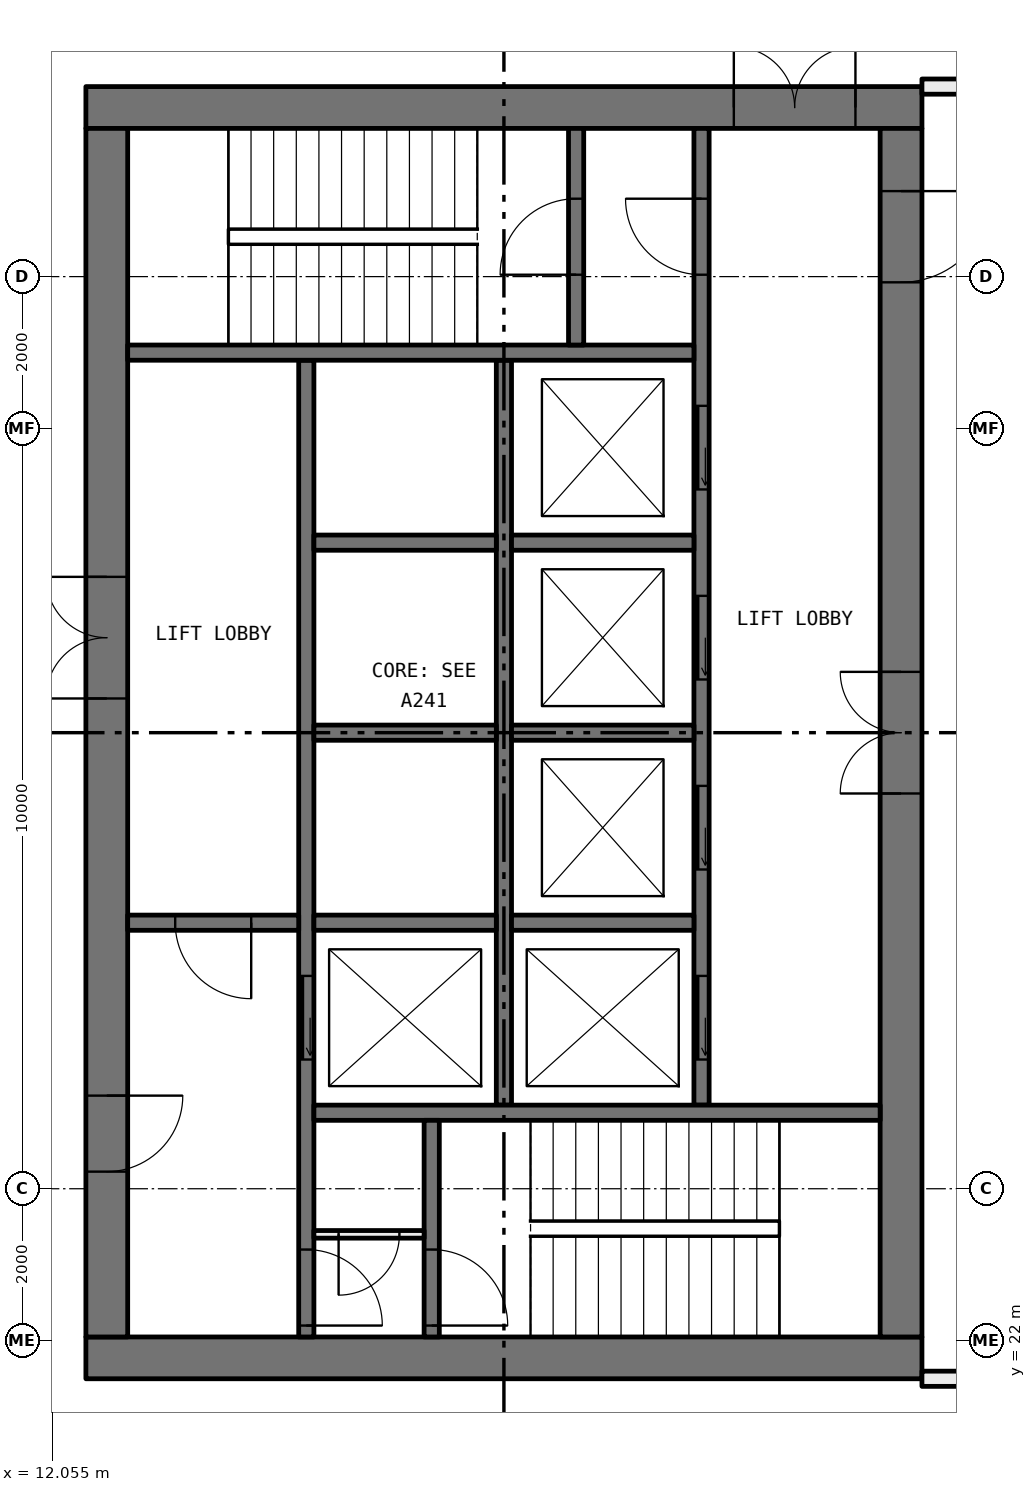
"""IFC4 building model, lengths in metres.
Left out: names, types, materials, properties, quantities, classifications, styles, units other than length and angle.
Written with IfcOpenShell. Run it as: python <this file> out.ifc"""

import sys

from ifc_helpers import new_model, si_unit, direction, frame, frame_2d, origin, place, context, subcontext, project, spatial, rectangle, extrude, element, fill, save


model = new_model("IFC4")
c1 = context("Model", 3, precision=1e-05, world=origin(), true_north=direction((0.0, 1.0)))
c2 = subcontext(c1, "Body", "Model", "MODEL_VIEW")
j1 = project(units=[si_unit("LENGTHUNIT", "METRE"), si_unit("PLANEANGLEUNIT", "RADIAN")], contexts=[c1])
p1 = place(None, origin())
s1 = spatial("IfcSite", under=j1, at=p1, CompositionType="ELEMENT")
p2 = place(p1, origin())
s2 = spatial("IfcBuilding", under=s1, at=p2, CompositionType="ELEMENT")
p3 = place(p2, frame((0.0, 0.0, 153.75)))
s3 = spatial("IfcBuildingStorey", under=s2, at=p3, CompositionType="ELEMENT", Elevation=153.75)
p4 = place(p3, frame((23.5, 21.5, 0.0), z_axis=(0.0, 0.0, 1.0), x_axis=(1.0, 0.0, 0.0)))
e1 = element("IfcWall", 1, at=p4, inside=s3, PredefinedType="PARTITIONING", context=c2, shape_type="SweptSolid", body=[
    extrude(rectangle(XDim=6.0, YDim=0.2, at=frame_2d((3.0, 0.0))), origin(), (0.0, 0.0, 1.0), 4.1),
])
p5 = place(p4, frame((2.55, 0.0, 0.0)))
e2 = element("IfcOpeningElement", 2, at=p5, cuts=e1, PredefinedType="OPENING", context=c2, shape_type="SweptSolid", body=[
    extrude(rectangle(XDim=0.9, YDim=2.1, at=frame_2d((0.45, 1.05))), frame((0.0, 0.11, 0.0), z_axis=(0.0, -1.0, 0.0), x_axis=(1.0, 0.0, 0.0)), (0.0, 0.0, 1.0), 0.22),
])
p6 = place(p3, frame((29.5, 38.5, 0.0), z_axis=(0.0, 0.0, 1.0), x_axis=(-1.0, 0.0, 0.0)))
e3 = element("IfcWall", 3, at=p6, inside=s3, PredefinedType="PARTITIONING", context=c2, shape_type="SweptSolid", body=[
    extrude(rectangle(XDim=6.0, YDim=0.2, at=frame_2d((3.0, 0.0))), origin(), (0.0, 0.0, 1.0), 4.1),
])
p7 = place(p3, frame((12.5, 21.775, 0.0), z_axis=(0.0, 0.0, 1.0), x_axis=(1.0, 0.0, 0.0)))
e4 = element("IfcWall", 4, at=p7, inside=s3, PredefinedType="SHEAR", context=c2, shape_type="SweptSolid", body=[
    extrude(rectangle(XDim=11.0, YDim=0.55, at=frame_2d((5.5, 0.0))), origin(), (0.0, 0.0, 1.0), 4.1),
])
p8 = place(p3, frame((12.5, 38.225, 0.0), z_axis=(0.0, 0.0, 1.0), x_axis=(1.0, 0.0, 0.0)))
e5 = element("IfcWall", 5, at=p8, inside=s3, PredefinedType="SHEAR", context=c2, shape_type="SweptSolid", body=[
    extrude(rectangle(XDim=11.0, YDim=0.55, at=frame_2d((5.5, 0.0))), origin(), (0.0, 0.0, 1.0), 4.1),
])
p9 = place(p8, frame((8.525, 0.0, 0.0)))
e6 = element("IfcOpeningElement", 6, at=p9, cuts=e5, PredefinedType="OPENING", context=c2, shape_type="SweptSolid", body=[
    extrude(rectangle(XDim=1.6, YDim=2.1, at=frame_2d((0.8, 1.05))), frame((0.0, 0.285, 0.0), z_axis=(0.0, -1.0, 0.0), x_axis=(1.0, 0.0, 0.0)), (0.0, 0.0, 1.0), 0.57),
])
p10 = place(p3, frame((12.775, 22.05, 0.0), z_axis=(0.0, 0.0, 1.0), x_axis=(0.0, 1.0, 0.0)))
e7 = element("IfcWall", 7, at=p10, inside=s3, PredefinedType="SHEAR", context=c2, shape_type="SweptSolid", body=[
    extrude(rectangle(XDim=15.9, YDim=0.55, at=frame_2d((7.95, 0.0))), origin(), (0.0, 0.0, 1.0), 4.1),
])
p11 = place(p10, frame((8.4, 0.0, 0.0)))
e8 = element("IfcOpeningElement", 8, at=p11, cuts=e7, PredefinedType="OPENING", context=c2, shape_type="SweptSolid", body=[
    extrude(rectangle(XDim=1.6, YDim=2.1, at=frame_2d((0.8, 1.05))), frame((0.0, 0.285, 0.0), z_axis=(0.0, -1.0, 0.0), x_axis=(1.0, 0.0, 0.0)), (0.0, 0.0, 1.0), 0.57),
])
p12 = place(p10, frame((2.175, 0.0, 0.0)))
e9 = element("IfcOpeningElement", 9, at=p12, cuts=e7, PredefinedType="OPENING", context=c2, shape_type="SweptSolid", body=[
    extrude(rectangle(XDim=1.0, YDim=2.1, at=frame_2d((0.5, 1.05))), frame((0.0, 0.285, 0.0), z_axis=(0.0, -1.0, 0.0), x_axis=(1.0, 0.0, 0.0)), (0.0, 0.0, 1.0), 0.57),
])
p13 = place(p3, frame((23.225, 22.05, 0.0), z_axis=(0.0, 0.0, 1.0), x_axis=(0.0, 1.0, 0.0)))
e10 = element("IfcWall", 10, at=p13, inside=s3, PredefinedType="SHEAR", context=c2, shape_type="SweptSolid", body=[
    extrude(rectangle(XDim=15.9, YDim=0.55, at=frame_2d((7.95, 0.0))), origin(), (0.0, 0.0, 1.0), 4.1),
])
p14 = place(p13, frame((7.15, 0.0, 0.0)))
e11 = element("IfcOpeningElement", 11, at=p14, cuts=e10, PredefinedType="OPENING", context=c2, shape_type="SweptSolid", body=[
    extrude(rectangle(XDim=1.6, YDim=2.1, at=frame_2d((0.8, 1.05))), frame((0.0, 0.285, 0.0), z_axis=(0.0, -1.0, 0.0), x_axis=(1.0, 0.0, 0.0)), (0.0, 0.0, 1.0), 0.57),
])
p15 = place(p13, frame((13.875, 0.0, 0.0)))
e12 = element("IfcOpeningElement", 12, at=p15, cuts=e10, PredefinedType="OPENING", context=c2, shape_type="SweptSolid", body=[
    extrude(rectangle(XDim=1.2, YDim=2.1, at=frame_2d((0.6, 1.05))), frame((0.0, 0.285, 0.0), z_axis=(0.0, -1.0, 0.0), x_axis=(1.0, 0.0, 0.0)), (0.0, 0.0, 1.0), 0.57),
])
p16 = place(p3, frame((15.4, 22.05, 0.0), z_axis=(0.0, 0.0, 1.0), x_axis=(0.0, 1.0, 0.0)))
e13 = element("IfcWall", 13, at=p16, inside=s3, PredefinedType="SOLIDWALL", context=c2, shape_type="SweptSolid", body=[
    extrude(rectangle(XDim=12.85, YDim=0.2, at=frame_2d((6.425, 0.0))), origin(), (0.0, 0.0, 1.0), 4.1),
])
p17 = place(p16, frame((3.65, 0.0, 0.0)))
e14 = element("IfcOpeningElement", 14, at=p17, cuts=e13, PredefinedType="OPENING", context=c2, shape_type="SweptSolid", body=[
    extrude(rectangle(XDim=1.1, YDim=2.1, at=frame_2d((0.55, 1.05))), frame((0.0, 0.11, 0.0), z_axis=(0.0, -1.0, 0.0), x_axis=(1.0, 0.0, 0.0)), (0.0, 0.0, 1.0), 0.22),
])
p18 = place(p16, frame((0.15, 0.0, 0.0)))
e15 = element("IfcOpeningElement", 15, at=p18, cuts=e13, PredefinedType="OPENING", context=c2, shape_type="SweptSolid", body=[
    extrude(rectangle(XDim=1.0, YDim=2.1, at=frame_2d((0.5, 1.05))), frame((0.0, 0.11, 0.0), z_axis=(0.0, -1.0, 0.0), x_axis=(1.0, 0.0, 0.0)), (0.0, 0.0, 1.0), 0.22),
])
p19 = place(p3, frame((20.6, 25.1, 0.0), z_axis=(0.0, 0.0, 1.0), x_axis=(0.0, 1.0, 0.0)))
e16 = element("IfcWall", 16, at=p19, inside=s3, PredefinedType="SOLIDWALL", context=c2, shape_type="SweptSolid", body=[
    extrude(rectangle(XDim=12.85, YDim=0.2, at=frame_2d((6.425, 0.0))), origin(), (0.0, 0.0, 1.0), 4.1),
])
p20 = place(p19, frame((0.6, 0.0, 0.0)))
e17 = element("IfcOpeningElement", 17, at=p20, cuts=e16, PredefinedType="OPENING", context=c2, shape_type="SweptSolid", body=[
    extrude(rectangle(XDim=1.1, YDim=2.1, at=frame_2d((0.55, 1.05))), frame((0.0, 0.11, 0.0), z_axis=(0.0, -1.0, 0.0), x_axis=(1.0, 0.0, 0.0)), (0.0, 0.0, 1.0), 0.22),
])
p21 = place(p19, frame((3.1, 0.0, 0.0)))
e18 = element("IfcOpeningElement", 18, at=p21, cuts=e16, PredefinedType="OPENING", context=c2, shape_type="SweptSolid", body=[
    extrude(rectangle(XDim=1.1, YDim=2.1, at=frame_2d((0.55, 1.05))), frame((0.0, 0.11, 0.0), z_axis=(0.0, -1.0, 0.0), x_axis=(1.0, 0.0, 0.0)), (0.0, 0.0, 1.0), 0.22),
])
p22 = place(p19, frame((5.6, 0.0, 0.0)))
e19 = element("IfcOpeningElement", 19, at=p22, cuts=e16, PredefinedType="OPENING", context=c2, shape_type="SweptSolid", body=[
    extrude(rectangle(XDim=1.1, YDim=2.1, at=frame_2d((0.55, 1.05))), frame((0.0, 0.11, 0.0), z_axis=(0.0, -1.0, 0.0), x_axis=(1.0, 0.0, 0.0)), (0.0, 0.0, 1.0), 0.22),
])
p23 = place(p19, frame((8.1, 0.0, 0.0)))
e20 = element("IfcOpeningElement", 20, at=p23, cuts=e16, PredefinedType="OPENING", context=c2, shape_type="SweptSolid", body=[
    extrude(rectangle(XDim=1.1, YDim=2.1, at=frame_2d((0.55, 1.05))), frame((0.0, 0.11, 0.0), z_axis=(0.0, -1.0, 0.0), x_axis=(1.0, 0.0, 0.0)), (0.0, 0.0, 1.0), 0.22),
])
p24 = place(p19, frame((10.925, 0.0, 0.0)))
e21 = element("IfcOpeningElement", 21, at=p24, cuts=e16, PredefinedType="OPENING", context=c2, shape_type="SweptSolid", body=[
    extrude(rectangle(XDim=1.0, YDim=2.1, at=frame_2d((0.5, 1.05))), frame((0.0, 0.11, 0.0), z_axis=(0.0, -1.0, 0.0), x_axis=(1.0, 0.0, 0.0)), (0.0, 0.0, 1.0), 0.22),
])
p25 = place(p3, frame((18.0, 25.1, 0.0), z_axis=(0.0, 0.0, 1.0), x_axis=(0.0, 1.0, 0.0)))
e22 = element("IfcWall", 22, at=p25, inside=s3, PredefinedType="SOLIDWALL", context=c2, shape_type="SweptSolid", body=[
    extrude(rectangle(XDim=9.8, YDim=0.2, at=frame_2d((4.9, 0.0))), origin(), (0.0, 0.0, 1.0), 4.1),
])
for number, where, z_axis, x_axis in (
    (23, (15.5, 25.0, 0.0), (0.0, 0.0, 1.0), (1.0, 0.0, 0.0)),
    (24, (13.05, 35.0, 0.0), (0.0, 0.0, 1.0), (1.0, 0.0, 0.0)),
):
    element("IfcWall", number, at=place(p3, frame(where, z_axis=z_axis, x_axis=x_axis)), inside=s3, PredefinedType="SOLIDWALL", context=c2, shape_type="SweptSolid", body=[
        extrude(rectangle(XDim=7.45, YDim=0.2, at=frame_2d((3.725, 0.0))), origin(), (0.0, 0.0, 1.0), 4.1),
    ])
p26 = place(p3, frame((13.05, 27.5, 0.0), z_axis=(0.0, 0.0, 1.0), x_axis=(1.0, 0.0, 0.0)))
e25 = element("IfcWall", 25, at=p26, inside=s3, PredefinedType="SOLIDWALL", context=c2, shape_type="SweptSolid", body=[
    extrude(rectangle(XDim=2.25, YDim=0.2, at=frame_2d((1.125, 0.0))), origin(), (0.0, 0.0, 1.0), 4.1),
])
p27 = place(p26, frame((0.625, 0.0, 0.0)))
e26 = element("IfcOpeningElement", 26, at=p27, cuts=e25, PredefinedType="OPENING", context=c2, shape_type="SweptSolid", body=[
    extrude(rectangle(XDim=1.0, YDim=2.1, at=frame_2d((0.5, 1.05))), frame((0.0, 0.11, 0.0), z_axis=(0.0, -1.0, 0.0), x_axis=(1.0, 0.0, 0.0)), (0.0, 0.0, 1.0), 0.22),
])
p28 = place(p3, frame((17.05, 22.05, 0.0), z_axis=(0.0, 0.0, 1.0), x_axis=(0.0, 1.0, 0.0)))
e27 = element("IfcWall", 27, at=p28, inside=s3, PredefinedType="SOLIDWALL", context=c2, shape_type="SweptSolid", body=[
    extrude(rectangle(XDim=2.85, YDim=0.2, at=frame_2d((1.425, 0.0))), origin(), (0.0, 0.0, 1.0), 4.1),
])
p29 = place(p28, frame((0.15, 0.0, 0.0)))
e28 = element("IfcOpeningElement", 28, at=p29, cuts=e27, PredefinedType="OPENING", context=c2, shape_type="SweptSolid", body=[
    extrude(rectangle(XDim=1.0, YDim=2.1, at=frame_2d((0.5, 1.05))), frame((0.0, 0.11, 0.0), z_axis=(0.0, -1.0, 0.0), x_axis=(1.0, 0.0, 0.0)), (0.0, 0.0, 1.0), 0.22),
])
p30 = place(p3, frame((18.95, 35.1, 0.0), z_axis=(0.0, 0.0, 1.0), x_axis=(0.0, 1.0, 0.0)))
e29 = element("IfcWall", 29, at=p30, inside=s3, PredefinedType="SOLIDWALL", context=c2, shape_type="SweptSolid", body=[
    extrude(rectangle(XDim=2.85, YDim=0.2, at=frame_2d((1.425, 0.0))), origin(), (0.0, 0.0, 1.0), 4.1),
])
p31 = place(p30, frame((0.925, 0.0, 0.0)))
e30 = element("IfcOpeningElement", 30, at=p31, cuts=e29, PredefinedType="OPENING", context=c2, shape_type="SweptSolid", body=[
    extrude(rectangle(XDim=1.0, YDim=2.1, at=frame_2d((0.5, 1.05))), frame((0.0, 0.11, 0.0), z_axis=(0.0, -1.0, 0.0), x_axis=(1.0, 0.0, 0.0)), (0.0, 0.0, 1.0), 0.22),
])
for number, where, z_axis, x_axis in (
    (31, (15.5, 27.5, 0.0), (0.0, 0.0, 1.0), (1.0, 0.0, 0.0)),
    (32, (15.5, 30.0, 0.0), (0.0, 0.0, 1.0), (1.0, 0.0, 0.0)),
    (33, (15.5, 32.5, 0.0), (0.0, 0.0, 1.0), (1.0, 0.0, 0.0)),
    (34, (18.1, 27.5, 0.0), (0.0, 0.0, 1.0), (1.0, 0.0, 0.0)),
    (35, (18.1, 30.0, 0.0), (0.0, 0.0, 1.0), (1.0, 0.0, 0.0)),
    (36, (18.1, 32.5, 0.0), (0.0, 0.0, 1.0), (1.0, 0.0, 0.0)),
):
    element("IfcWall", number, at=place(p3, frame(where, z_axis=z_axis, x_axis=x_axis)), inside=s3, PredefinedType="SOLIDWALL", context=c2, shape_type="SweptSolid", body=[
        extrude(rectangle(XDim=2.4, YDim=0.2, at=frame_2d((1.2, 0.0))), origin(), (0.0, 0.0, 1.0), 4.1),
    ])
p32 = place(p3, frame((15.5, 23.4, 0.0), z_axis=(0.0, 0.0, 1.0), x_axis=(1.0, 0.0, 0.0)))
e37 = element("IfcWall", 37, at=p32, inside=s3, PredefinedType="PARTITIONING", context=c2, shape_type="SweptSolid", body=[
    extrude(rectangle(XDim=1.45, YDim=0.1, at=frame_2d((0.725, 0.0))), origin(), (0.0, 0.0, 1.0), 4.1),
])
p33 = place(p32, frame((0.325, 0.0, 0.0)))
e38 = element("IfcOpeningElement", 38, at=p33, cuts=e37, PredefinedType="OPENING", context=c2, shape_type="SweptSolid", body=[
    extrude(rectangle(XDim=0.8, YDim=2.1, at=frame_2d((0.4, 1.05))), frame((0.0, 0.06, 0.0), z_axis=(0.0, -1.0, 0.0), x_axis=(1.0, 0.0, 0.0)), (0.0, 0.0, 1.0), 0.12),
])
p34 = place(p20, origin())
e39 = element("IfcDoor", 39, at=p34, inside=s3, OperationType="SLIDING_TO_LEFT", PredefinedType="DOOR", context=c2, shape_type="SweptSolid", body=[
    extrude(rectangle(XDim=1.1, YDim=2.1, at=frame_2d((0.55, 1.05))), frame((0.0, 0.025, 0.0), z_axis=(0.0, -1.0, 0.0), x_axis=(1.0, 0.0, 0.0)), (0.0, 0.0, 1.0), 0.05),
])
fill(e17, e39)
p35 = place(p21, origin())
e40 = element("IfcDoor", 40, at=p35, inside=s3, OperationType="SLIDING_TO_LEFT", PredefinedType="DOOR", context=c2, shape_type="SweptSolid", body=[
    extrude(rectangle(XDim=1.1, YDim=2.1, at=frame_2d((0.55, 1.05))), frame((0.0, 0.025, 0.0), z_axis=(0.0, -1.0, 0.0), x_axis=(1.0, 0.0, 0.0)), (0.0, 0.0, 1.0), 0.05),
])
fill(e18, e40)
p36 = place(p22, origin())
e41 = element("IfcDoor", 41, at=p36, inside=s3, OperationType="SLIDING_TO_LEFT", PredefinedType="DOOR", context=c2, shape_type="SweptSolid", body=[
    extrude(rectangle(XDim=1.1, YDim=2.1, at=frame_2d((0.55, 1.05))), frame((0.0, 0.025, 0.0), z_axis=(0.0, -1.0, 0.0), x_axis=(1.0, 0.0, 0.0)), (0.0, 0.0, 1.0), 0.05),
])
fill(e19, e41)
p37 = place(p23, origin())
e42 = element("IfcDoor", 42, at=p37, inside=s3, OperationType="SLIDING_TO_LEFT", PredefinedType="DOOR", context=c2, shape_type="SweptSolid", body=[
    extrude(rectangle(XDim=1.1, YDim=2.1, at=frame_2d((0.55, 1.05))), frame((0.0, 0.025, 0.0), z_axis=(0.0, -1.0, 0.0), x_axis=(1.0, 0.0, 0.0)), (0.0, 0.0, 1.0), 0.05),
])
fill(e20, e42)
p38 = place(p17, origin())
e43 = element("IfcDoor", 43, at=p38, inside=s3, OperationType="SLIDING_TO_LEFT", PredefinedType="DOOR", context=c2, shape_type="SweptSolid", body=[
    extrude(rectangle(XDim=1.1, YDim=2.1, at=frame_2d((0.55, 1.05))), frame((0.0, 0.025, 0.0), z_axis=(0.0, -1.0, 0.0), x_axis=(1.0, 0.0, 0.0)), (0.0, 0.0, 1.0), 0.05),
])
fill(e14, e43)
p39 = place(p29, frame((1.0, 0.0, 0.0), x_axis=(-1.0, 0.0, 0.0)))
e44 = element("IfcDoor", 44, at=p39, inside=s3, OperationType="SINGLE_SWING_LEFT", PredefinedType="DOOR", context=c2, shape_type="SweptSolid", body=[
    extrude(rectangle(XDim=1.0, YDim=2.1, at=frame_2d((0.5, 1.05))), frame((0.0, 0.025, 0.0), z_axis=(0.0, -1.0, 0.0), x_axis=(1.0, 0.0, 0.0)), (0.0, 0.0, 1.0), 0.05),
])
fill(e28, e44)
p40 = place(p18, frame((1.0, 0.0, 0.0), x_axis=(-1.0, 0.0, 0.0)))
e45 = element("IfcDoor", 45, at=p40, inside=s3, OperationType="SINGLE_SWING_LEFT", PredefinedType="DOOR", context=c2, shape_type="SweptSolid", body=[
    extrude(rectangle(XDim=1.0, YDim=2.1, at=frame_2d((0.5, 1.05))), frame((0.0, 0.025, 0.0), z_axis=(0.0, -1.0, 0.0), x_axis=(1.0, 0.0, 0.0)), (0.0, 0.0, 1.0), 0.05),
])
fill(e15, e45)
p41 = place(p24, origin())
e46 = element("IfcDoor", 46, at=p41, inside=s3, OperationType="SINGLE_SWING_LEFT", PredefinedType="DOOR", context=c2, shape_type="SweptSolid", body=[
    extrude(rectangle(XDim=1.0, YDim=2.1, at=frame_2d((0.5, 1.05))), frame((0.0, 0.025, 0.0), z_axis=(0.0, -1.0, 0.0), x_axis=(1.0, 0.0, 0.0)), (0.0, 0.0, 1.0), 0.05),
])
fill(e21, e46)
p42 = place(p31, origin())
e47 = element("IfcDoor", 47, at=p42, inside=s3, OperationType="SINGLE_SWING_RIGHT", PredefinedType="DOOR", context=c2, shape_type="SweptSolid", body=[
    extrude(rectangle(XDim=1.0, YDim=2.1, at=frame_2d((0.5, 1.05))), frame((0.0, 0.025, 0.0), z_axis=(0.0, -1.0, 0.0), x_axis=(1.0, 0.0, 0.0)), (0.0, 0.0, 1.0), 0.05),
])
fill(e30, e47)
p43 = place(p27, frame((1.0, 0.0, 0.0), x_axis=(-1.0, 0.0, 0.0)))
e48 = element("IfcDoor", 48, at=p43, inside=s3, OperationType="SINGLE_SWING_RIGHT", PredefinedType="DOOR", context=c2, shape_type="SweptSolid", body=[
    extrude(rectangle(XDim=1.0, YDim=2.1, at=frame_2d((0.5, 1.05))), frame((0.0, 0.025, 0.0), z_axis=(0.0, -1.0, 0.0), x_axis=(1.0, 0.0, 0.0)), (0.0, 0.0, 1.0), 0.05),
])
fill(e26, e48)
p44 = place(p33, frame((0.8, 0.0, 0.0), x_axis=(-1.0, 0.0, 0.0)))
e49 = element("IfcDoor", 49, at=p44, inside=s3, OperationType="SINGLE_SWING_LEFT", PredefinedType="DOOR", context=c2, shape_type="SweptSolid", body=[
    extrude(rectangle(XDim=0.8, YDim=2.1, at=frame_2d((0.4, 1.05))), frame((0.0, 0.025, 0.0), z_axis=(0.0, -1.0, 0.0), x_axis=(1.0, 0.0, 0.0)), (0.0, 0.0, 1.0), 0.05),
])
fill(e38, e49)
p45 = place(p11, origin())
e50 = element("IfcDoor", 50, at=p45, inside=s3, OperationType="DOUBLE_DOOR_SINGLE_SWING", PredefinedType="DOOR", context=c2, shape_type="SweptSolid", body=[
    extrude(rectangle(XDim=1.6, YDim=2.1, at=frame_2d((0.8, 1.05))), frame((0.0, 0.025, 0.0), z_axis=(0.0, -1.0, 0.0), x_axis=(1.0, 0.0, 0.0)), (0.0, 0.0, 1.0), 0.05),
])
fill(e8, e50)
p46 = place(p12, frame((1.0, 0.0, 0.0), x_axis=(-1.0, 0.0, 0.0)))
e51 = element("IfcDoor", 51, at=p46, inside=s3, OperationType="SINGLE_SWING_RIGHT", PredefinedType="DOOR", context=c2, shape_type="SweptSolid", body=[
    extrude(rectangle(XDim=1.0, YDim=2.1, at=frame_2d((0.5, 1.05))), frame((0.0, 0.025, 0.0), z_axis=(0.0, -1.0, 0.0), x_axis=(1.0, 0.0, 0.0)), (0.0, 0.0, 1.0), 0.05),
])
fill(e9, e51)
p47 = place(p9, origin())
e52 = element("IfcDoor", 52, at=p47, inside=s3, OperationType="DOUBLE_DOOR_SINGLE_SWING", PredefinedType="DOOR", context=c2, shape_type="SweptSolid", body=[
    extrude(rectangle(XDim=1.6, YDim=2.1, at=frame_2d((0.8, 1.05))), frame((0.0, 0.025, 0.0), z_axis=(0.0, -1.0, 0.0), x_axis=(1.0, 0.0, 0.0)), (0.0, 0.0, 1.0), 0.05),
])
fill(e6, e52)
p48 = place(p14, origin())
e53 = element("IfcDoor", 53, at=p48, inside=s3, OperationType="DOUBLE_DOOR_SINGLE_SWING", PredefinedType="DOOR", context=c2, shape_type="SweptSolid", body=[
    extrude(rectangle(XDim=1.6, YDim=2.1, at=frame_2d((0.8, 1.05))), frame((0.0, 0.025, 0.0), z_axis=(0.0, -1.0, 0.0), x_axis=(1.0, 0.0, 0.0)), (0.0, 0.0, 1.0), 0.05),
])
fill(e11, e53)
p49 = place(p15, frame((1.2, 0.0, 0.0), x_axis=(-1.0, 0.0, 0.0)))
e54 = element("IfcDoor", 54, at=p49, inside=s3, OperationType="SINGLE_SWING_RIGHT", PredefinedType="DOOR", context=c2, shape_type="SweptSolid", body=[
    extrude(rectangle(XDim=1.2, YDim=2.1, at=frame_2d((0.6, 1.05))), frame((0.0, 0.025, 0.0), z_axis=(0.0, -1.0, 0.0), x_axis=(1.0, 0.0, 0.0)), (0.0, 0.0, 1.0), 0.05),
])
fill(e12, e54)
save(model, sys.argv[1])
